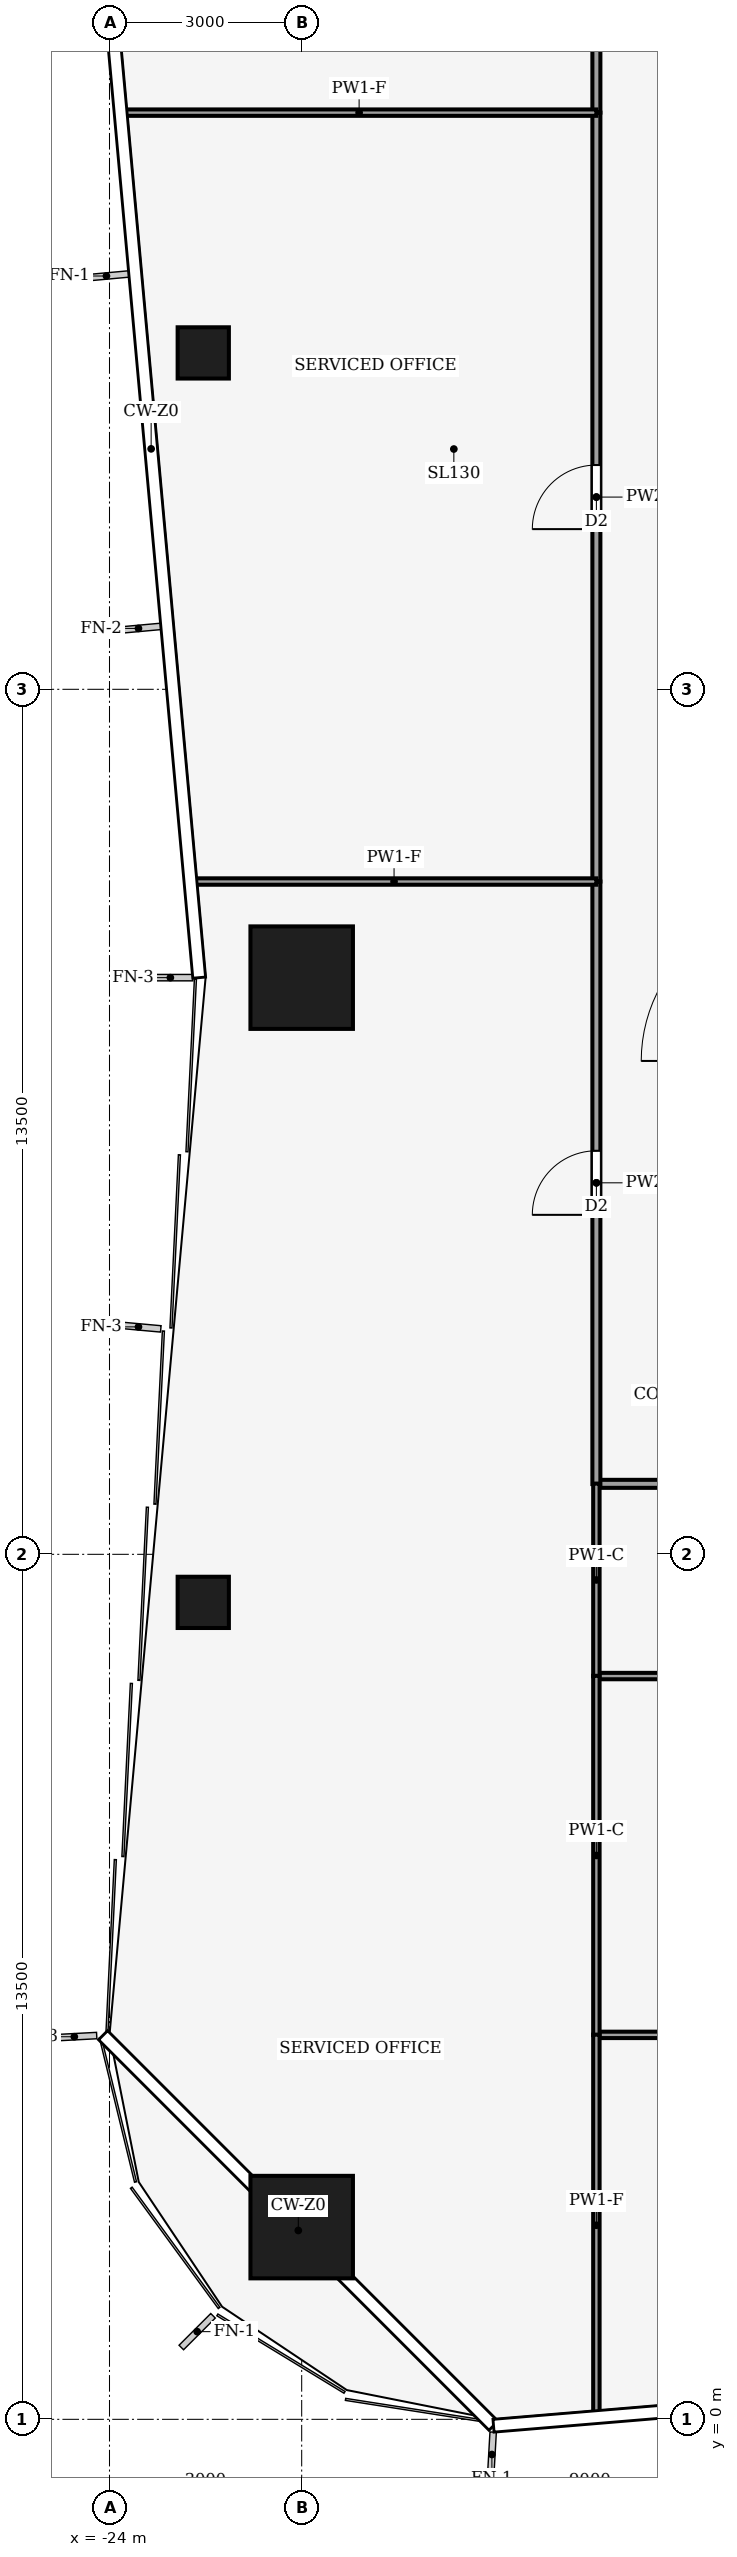
"""IFC4 building model, lengths in metres.
Left out: names, types, materials, properties, quantities, classifications, styles, units other than length and angle.
Written with IfcOpenShell. Run it as: python <this file> out.ifc"""

import sys

from ifc_helpers import new_model, si_unit, direction, frame, frame_2d, origin, origin_2d, place, context, subcontext, project, spatial, rectangle, hollow_rectangle, extrude, element, fill, save


model = new_model("IFC4")
c1 = context("Model", 3, precision=1e-05, world=origin(), true_north=direction((0.0, 1.0)))
c2 = subcontext(c1, "Body", "Model", "MODEL_VIEW")
j1 = project(units=[si_unit("LENGTHUNIT", "METRE"), si_unit("PLANEANGLEUNIT", "RADIAN")], contexts=[c1])
p1 = place(None, origin())
s1 = spatial("IfcSite", under=j1, at=p1, CompositionType="ELEMENT")
p2 = place(p1, origin())
s2 = spatial("IfcBuilding", under=s1, at=p2, CompositionType="ELEMENT")
p3 = place(p2, frame((0.0, 0.0, 26.0)))
s3 = spatial("IfcBuildingStorey", under=s2, at=p3, CompositionType="ELEMENT", Elevation=26.0)
for number, where, z_axis, x_axis in (
    (1, (-21.0, 3.0, 0.0), (0.0, 0.0, 1.0), (1.0, 0.0, 0.0)),
    (2, (-21.0, 22.5, 0.0), (0.0, 0.0, 1.0), (1.0, 0.0, 0.0)),
):
    element("IfcColumn", number, at=place(p3, frame(where, z_axis=z_axis, x_axis=x_axis)), inside=s3, PredefinedType="COLUMN", context=c2, shape_type="SweptSolid", body=[
        extrude(hollow_rectangle(XDim=1.6, YDim=1.6, WallThickness=0.09, at=origin_2d()), origin(), (0.0, 0.0, 1.0), 4.0),
    ])
for number, where, z_axis, x_axis in (
    (3, (-22.536, 12.75, 0.0), (0.0, 0.0, 1.0), (1.0, 0.0, 0.0)),
    (4, (-22.536, 32.25, 0.0), (0.0, 0.0, 1.0), (1.0, 0.0, 0.0)),
):
    element("IfcColumn", number, at=place(p3, frame(where, z_axis=z_axis, x_axis=x_axis)), inside=s3, PredefinedType="COLUMN", context=c2, shape_type="SweptSolid", body=[
        extrude(hollow_rectangle(XDim=0.8, YDim=0.8, WallThickness=0.04, at=origin_2d()), origin(), (0.0, 0.0, 1.0), 4.0),
    ])
p4 = place(p3, frame((-9.0, 14.6, 0.0), z_axis=(0.0, 0.0, 1.0), x_axis=(-1.0, 0.0, 0.0)))
e5 = element("IfcWall", 5, at=p4, inside=s3, PredefinedType="PARTITIONING", context=c2, shape_type="SweptSolid", body=[
    extrude(rectangle(XDim=7.4, YDim=0.125, at=frame_2d((3.7, 0.0))), origin(), (0.0, 0.0, 1.0), 3.29),
])
p5 = place(p4, frame((3.2, 0.0, 0.0)))
e6 = element("IfcOpeningElement", 6, at=p5, cuts=e5, PredefinedType="OPENING", context=c2, shape_type="SweptSolid", body=[
    extrude(rectangle(XDim=1.0, YDim=2.1, at=frame_2d((0.5, 1.05))), frame((0.0, 0.073, 0.0), z_axis=(0.0, -1.0, 0.0), x_axis=(1.0, 0.0, 0.0)), (0.0, 0.0, 1.0), 0.145),
])
p6 = place(p3, frame((-16.4, 14.596, 0.0), z_axis=(0.0, 0.0, 1.0), x_axis=(0.0, 1.0, 0.0)))
e7 = element("IfcWall", 7, at=p6, inside=s3, PredefinedType="PARTITIONING", context=c2, shape_type="SweptSolid", body=[
    extrude(rectangle(XDim=9.404, YDim=0.125, at=frame_2d((4.702, 0.0))), origin(), (0.0, 0.0, 1.0), 3.14),
])
p7 = place(p6, frame((4.202, 0.0, 0.0)))
e8 = element("IfcOpeningElement", 8, at=p7, cuts=e7, PredefinedType="OPENING", context=c2, shape_type="SweptSolid", body=[
    extrude(rectangle(XDim=1.0, YDim=2.1, at=frame_2d((0.5, 1.05))), frame((0.0, 0.073, 0.0), z_axis=(0.0, -1.0, 0.0), x_axis=(1.0, 0.0, 0.0)), (0.0, 0.0, 1.0), 0.145),
])
p8 = place(p3, frame((-16.4, 24.0, 0.0), z_axis=(0.0, 0.0, 1.0), x_axis=(0.0, 1.0, 0.0)))
e9 = element("IfcWall", 9, at=p8, inside=s3, PredefinedType="PARTITIONING", context=c2, shape_type="SweptSolid", body=[
    extrude(rectangle(XDim=12.0, YDim=0.125, at=frame_2d((6.0, 0.0))), origin(), (0.0, 0.0, 1.0), 3.48),
])
p9 = place(p8, frame((5.5, 0.0, 0.0)))
e10 = element("IfcOpeningElement", 10, at=p9, cuts=e9, PredefinedType="OPENING", context=c2, shape_type="SweptSolid", body=[
    extrude(rectangle(XDim=1.0, YDim=2.1, at=frame_2d((0.5, 1.05))), frame((0.0, 0.073, 0.0), z_axis=(0.0, -1.0, 0.0), x_axis=(1.0, 0.0, 0.0)), (0.0, 0.0, 1.0), 0.145),
])
p10 = place(p3, frame((-16.4, 36.0, 0.0), z_axis=(0.0, 0.0, 1.0), x_axis=(0.0, 1.0, 0.0)))
e11 = element("IfcWall", 11, at=p10, inside=s3, PredefinedType="PARTITIONING", context=c2, shape_type="SweptSolid", body=[
    extrude(rectangle(XDim=5.404, YDim=0.125, at=frame_2d((2.702, 0.0))), origin(), (0.0, 0.0, 1.0), 3.14),
])
p11 = place(p10, frame((2.202, 0.0, 0.0)))
e12 = element("IfcOpeningElement", 12, at=p11, cuts=e11, PredefinedType="OPENING", context=c2, shape_type="SweptSolid", body=[
    extrude(rectangle(XDim=1.0, YDim=2.1, at=frame_2d((0.5, 1.05))), frame((0.0, 0.073, 0.0), z_axis=(0.0, -1.0, 0.0), x_axis=(1.0, 0.0, 0.0)), (0.0, 0.0, 1.0), 0.145),
])
p12 = place(p3, frame((-8.996, 11.6, 0.0), z_axis=(0.0, 0.0, 1.0), x_axis=(-1.0, 0.0, 0.0)))
e13 = element("IfcWall", 13, at=p12, inside=s3, PredefinedType="PARTITIONING", context=c2, shape_type="SweptSolid", body=[
    extrude(rectangle(XDim=7.404, YDim=0.1, at=frame_2d((3.702, 0.0))), origin(), (0.0, 0.0, 1.0), 3.29),
])
p13 = place(p12, frame((3.202, 0.0, 0.0)))
e14 = element("IfcOpeningElement", 14, at=p13, cuts=e13, PredefinedType="OPENING", context=c2, shape_type="SweptSolid", body=[
    extrude(rectangle(XDim=1.0, YDim=2.1, at=frame_2d((0.5, 1.05))), frame((0.0, 0.06, 0.0), z_axis=(0.0, -1.0, 0.0), x_axis=(1.0, 0.0, 0.0)), (0.0, 0.0, 1.0), 0.12),
])
p14 = place(p3, frame((-16.4, 14.604, 0.0), z_axis=(0.0, 0.0, 1.0), x_axis=(0.0, -1.0, 0.0)))
e15 = element("IfcWall", 15, at=p14, inside=s3, PredefinedType="PARTITIONING", context=c2, shape_type="SweptSolid", body=[
    extrude(rectangle(XDim=3.008, YDim=0.1, at=frame_2d((1.504, 0.0))), origin(), (0.0, 0.0, 1.0), 3.87),
])
p15 = place(p3, frame((-6.0, 6.0, 0.0), z_axis=(0.0, 0.0, 1.0), x_axis=(-1.0, 0.0, 0.0)))
e16 = element("IfcWall", 16, at=p15, inside=s3, PredefinedType="PARTITIONING", context=c2, shape_type="SweptSolid", body=[
    extrude(rectangle(XDim=10.4, YDim=0.1, at=frame_2d((5.2, 0.0))), origin(), (0.0, 0.0, 1.0), 3.29),
])
p16 = place(p15, frame((4.7, 0.0, 0.0)))
e17 = element("IfcOpeningElement", 17, at=p16, cuts=e16, PredefinedType="OPENING", context=c2, shape_type="SweptSolid", body=[
    extrude(rectangle(XDim=1.0, YDim=2.1, at=frame_2d((0.5, 1.05))), frame((0.0, 0.06, 0.0), z_axis=(0.0, -1.0, 0.0), x_axis=(1.0, 0.0, 0.0)), (0.0, 0.0, 1.0), 0.12),
])
p17 = place(p3, frame((-16.4, 11.604, 0.0), z_axis=(0.0, 0.0, 1.0), x_axis=(0.0, -1.0, 0.0)))
e18 = element("IfcWall", 18, at=p17, inside=s3, PredefinedType="PARTITIONING", context=c2, shape_type="SweptSolid", body=[
    extrude(rectangle(XDim=5.608, YDim=0.1, at=frame_2d((2.804, 0.0))), origin(), (0.0, 0.0, 1.0), 3.87),
])
p18 = place(p3, frame((-16.4, 6.004, 0.0), z_axis=(0.0, 0.0, 1.0), x_axis=(0.0, -1.0, 0.0)))
e19 = element("IfcWall", 19, at=p18, inside=s3, PredefinedType="PARTITIONING", context=c2, shape_type="SweptSolid", body=[
    extrude(rectangle(XDim=5.951, YDim=0.1, at=frame_2d((2.975, 0.0))), origin(), (0.0, 0.0, 1.0), 3.04),
])
p19 = place(p3, frame((-16.4, 24.0, 0.0), z_axis=(0.0, 0.0, 1.0), x_axis=(-1.0, 0.0, 0.0)))
e20 = element("IfcWall", 20, at=p19, inside=s3, PredefinedType="PARTITIONING", context=c2, shape_type="SweptSolid", body=[
    extrude(rectangle(XDim=6.316, YDim=0.1, at=frame_2d((3.158, 0.0))), origin(), (0.0, 0.0, 1.0), 3.04),
])
p20 = place(p3, frame((-16.4, 36.0, 0.0), z_axis=(0.0, 0.0, 1.0), x_axis=(-1.0, 0.0, 0.0)))
e21 = element("IfcWall", 21, at=p20, inside=s3, PredefinedType="PARTITIONING", context=c2, shape_type="SweptSolid", body=[
    extrude(rectangle(XDim=7.407, YDim=0.1, at=frame_2d((3.704, 0.0))), origin(), (0.0, 0.0, 1.0), 3.04),
])
p21 = place(p7, origin())
e22 = element("IfcDoor", 22, at=p21, inside=s3, OperationType="SINGLE_SWING_RIGHT", PredefinedType="DOOR", context=c2, shape_type="SweptSolid", body=[
    extrude(rectangle(XDim=1.0, YDim=2.1, at=frame_2d((0.5, 1.05))), frame((0.0, 0.025, 0.0), z_axis=(0.0, -1.0, 0.0), x_axis=(1.0, 0.0, 0.0)), (0.0, 0.0, 1.0), 0.05),
])
fill(e8, e22)
p22 = place(p9, origin())
e23 = element("IfcDoor", 23, at=p22, inside=s3, OperationType="SINGLE_SWING_LEFT", PredefinedType="DOOR", context=c2, shape_type="SweptSolid", body=[
    extrude(rectangle(XDim=1.0, YDim=2.1, at=frame_2d((0.5, 1.05))), frame((0.0, 0.025, 0.0), z_axis=(0.0, -1.0, 0.0), x_axis=(1.0, 0.0, 0.0)), (0.0, 0.0, 1.0), 0.05),
])
fill(e10, e23)
save(model, sys.argv[1])
